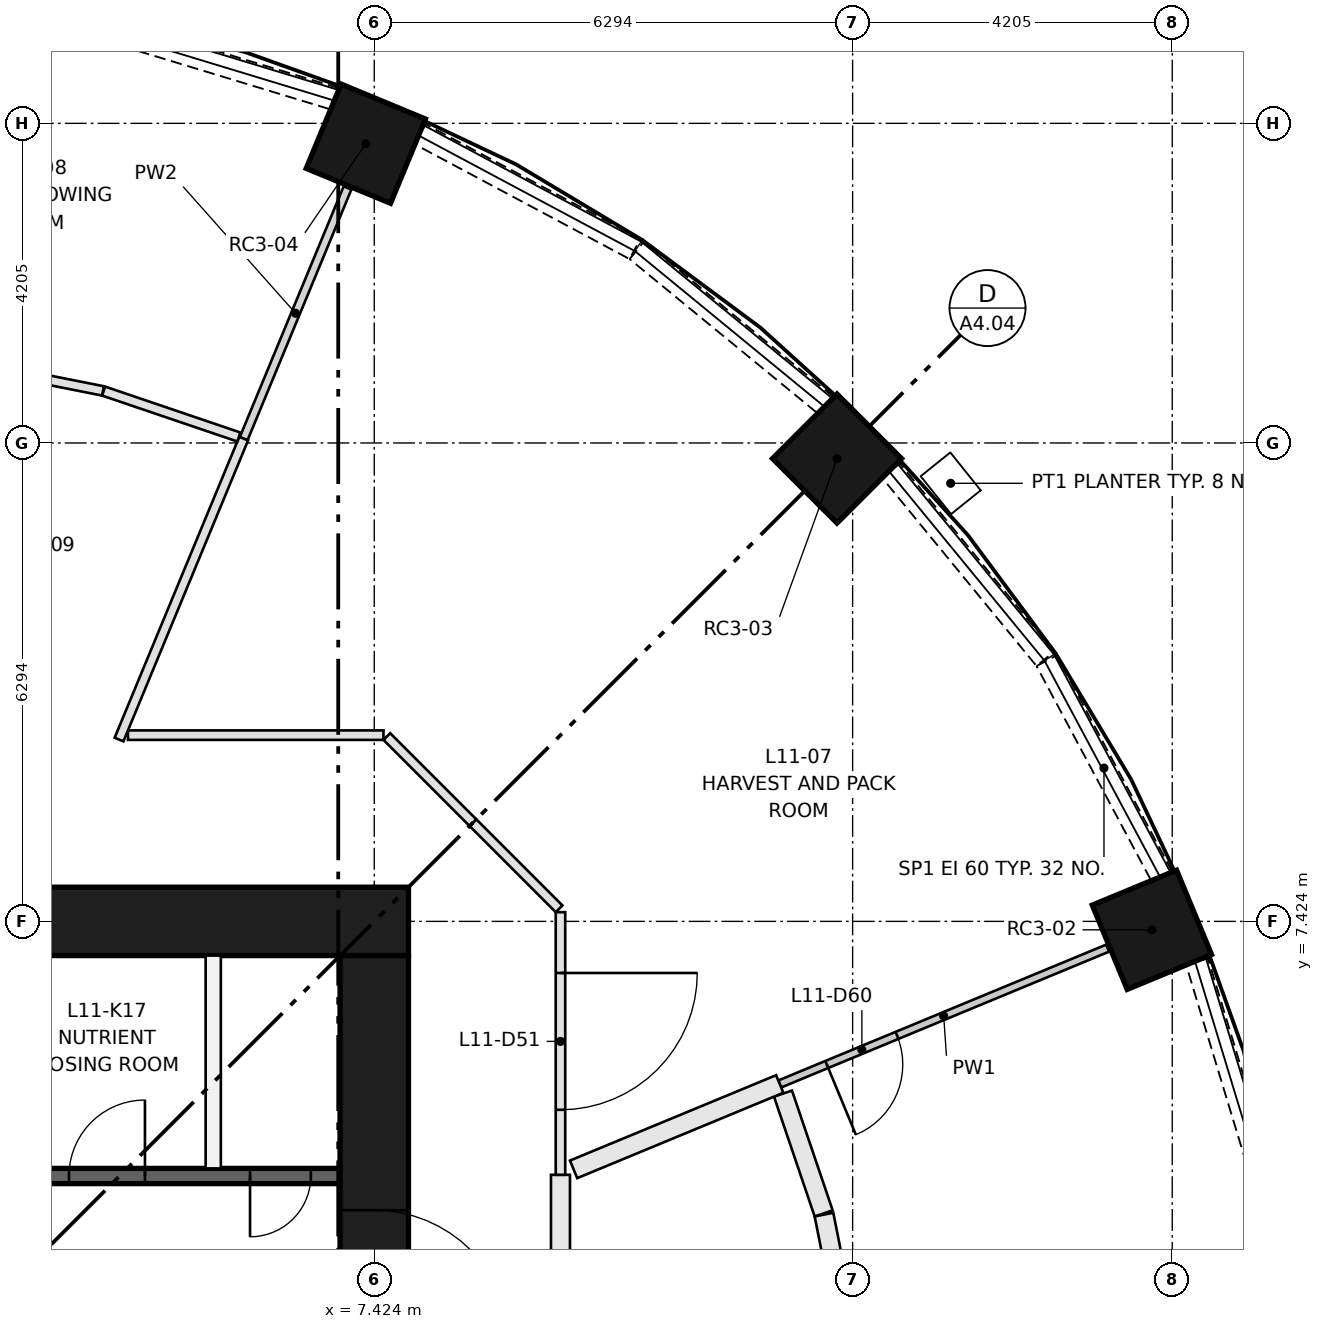
"""IFC4 building model, lengths in metres.
Left out: names, types, materials, properties, quantities, classifications, styles, units other than length and angle.
Written with IfcOpenShell. Run it as: python <this file> out.ifc"""

import sys

from ifc_helpers import new_model, si_unit, direction, frame, frame_2d, origin, origin_2d, place, context, subcontext, project, spatial, rectangle, extrude, element, fill, save


model = new_model("IFC4")
c1 = context("Model", 3, precision=1e-05, world=origin(), true_north=direction((0.0, 1.0)))
c2 = subcontext(c1, "Body", "Model", "MODEL_VIEW")
j1 = project(units=[si_unit("LENGTHUNIT", "METRE"), si_unit("PLANEANGLEUNIT", "RADIAN")], contexts=[c1])
p1 = place(None, origin())
s1 = spatial("IfcSite", under=j1, at=p1, CompositionType="ELEMENT")
p2 = place(p1, origin())
s2 = spatial("IfcBuilding", under=s1, at=p2, CompositionType="ELEMENT")
p3 = place(p2, frame((0.0, 0.0, 44.45)))
s3 = spatial("IfcBuildingStorey", under=s2, at=p3, CompositionType="ELEMENT", Elevation=44.45)
for number, where, z_axis, x_axis in (
    (1, (17.655, 7.313, 0.0), (0.0, 0.0, 1.0), (0.924, 0.383, 0.0)),
    (2, (13.513, 13.513, 0.0), (0.0, 0.0, 1.0), (0.707, 0.707, 0.0)),
    (3, (7.313, 17.655, 0.0), (0.0, 0.0, 1.0), (0.383, 0.924, 0.0)),
):
    element("IfcColumn", number, at=place(p3, frame(where, z_axis=z_axis, x_axis=x_axis)), inside=s3, PredefinedType="COLUMN", context=c2, shape_type="SweptSolid", body=[
        extrude(rectangle(XDim=1.2, YDim=1.2, at=origin_2d()), origin(), (0.0, 0.0, 1.0), 3.65),
    ])
p4 = place(p3, frame((-7.874, 7.424, 0.0), z_axis=(0.0, 0.0, 1.0), x_axis=(1.0, 0.0, 0.0)))
e4 = element("IfcWall", 4, at=p4, inside=s3, PredefinedType="SHEAR", context=c2, shape_type="SweptSolid", body=[
    extrude(rectangle(XDim=15.748, YDim=0.9, at=frame_2d((7.874, 0.0))), origin(), (0.0, 0.0, 1.0), 3.65),
])
p5 = place(p3, frame((7.424, -6.974, 0.0), z_axis=(0.0, 0.0, 1.0), x_axis=(0.0, 1.0, 0.0)))
e5 = element("IfcWall", 5, at=p5, inside=s3, PredefinedType="SHEAR", context=c2, shape_type="SweptSolid", body=[
    extrude(rectangle(XDim=13.948, YDim=0.9, at=frame_2d((6.974, 0.0))), origin(), (0.0, 0.0, 1.0), 3.65),
])
p6 = place(p5, frame((6.474, 0.0, 0.0)))
e6 = element("IfcOpeningElement", 6, at=p6, cuts=e5, PredefinedType="OPENING", context=c2, shape_type="SweptSolid", body=[
    extrude(rectangle(XDim=1.0, YDim=2.1, at=frame_2d((0.5, 1.05))), frame((0.0, 0.46, 0.0), z_axis=(0.0, -1.0, 0.0), x_axis=(1.0, 0.0, 0.0)), (0.0, 0.0, 1.0), 0.92),
])
p7 = place(p5, frame((3.35, 0.0, 0.0)))
e7 = element("IfcOpeningElement", 7, at=p7, cuts=e5, PredefinedType="OPENING", context=c2, shape_type="SweptSolid", body=[
    extrude(rectangle(XDim=1.8, YDim=2.1, at=frame_2d((0.9, 1.05))), frame((0.0, 0.46, 0.0), z_axis=(0.0, -1.0, 0.0), x_axis=(1.0, 0.0, 0.0)), (0.0, 0.0, 1.0), 0.92),
])
p8 = place(p5, frame((8.799, 0.0, 0.0)))
e8 = element("IfcOpeningElement", 8, at=p8, cuts=e5, PredefinedType="OPENING", context=c2, shape_type="SweptSolid", body=[
    extrude(rectangle(XDim=1.8, YDim=2.1, at=frame_2d((0.9, 1.05))), frame((0.0, 0.46, 0.0), z_axis=(0.0, -1.0, 0.0), x_axis=(1.0, 0.0, 0.0)), (0.0, 0.0, 1.0), 0.92),
])
p9 = place(p3, frame((0.0, 4.074, 0.0), z_axis=(0.0, 0.0, 1.0), x_axis=(1.0, 0.0, 0.0)))
e9 = element("IfcWall", 9, at=p9, inside=s3, PredefinedType="SHEAR", context=c2, shape_type="SweptSolid", body=[
    extrude(rectangle(XDim=6.974, YDim=0.2, at=frame_2d((3.487, 0.0))), origin(), (0.0, 0.0, 1.0), 3.3),
])
p10 = place(p9, frame((0.754, 0.0, 0.0)))
e10 = element("IfcOpeningElement", 10, at=p10, cuts=e9, PredefinedType="OPENING", context=c2, shape_type="SweptSolid", body=[
    extrude(rectangle(XDim=1.0, YDim=2.1, at=frame_2d((0.5, 1.05))), frame((0.0, 0.11, 0.0), z_axis=(0.0, -1.0, 0.0), x_axis=(1.0, 0.0, 0.0)), (0.0, 0.0, 1.0), 0.22),
])
p11 = place(p9, frame((3.407, 0.0, 0.0)))
e11 = element("IfcOpeningElement", 11, at=p11, cuts=e9, PredefinedType="OPENING", context=c2, shape_type="SweptSolid", body=[
    extrude(rectangle(XDim=1.0, YDim=2.1, at=frame_2d((0.5, 1.05))), frame((0.0, 0.11, 0.0), z_axis=(0.0, -1.0, 0.0), x_axis=(1.0, 0.0, 0.0)), (0.0, 0.0, 1.0), 0.22),
])
p12 = place(p9, frame((5.79, 0.0, 0.0)))
e12 = element("IfcOpeningElement", 12, at=p12, cuts=e9, PredefinedType="OPENING", context=c2, shape_type="SweptSolid", body=[
    extrude(rectangle(XDim=0.8, YDim=2.1, at=frame_2d((0.4, 1.05))), frame((0.0, 0.11, 0.0), z_axis=(0.0, -1.0, 0.0), x_axis=(1.0, 0.0, 0.0)), (0.0, 0.0, 1.0), 0.22),
])
p13 = place(p3, frame((5.305, 4.174, 0.0), z_axis=(0.0, 0.0, 1.0), x_axis=(0.0, 1.0, 0.0)))
e13 = element("IfcWall", 13, at=p13, inside=s3, PredefinedType="PARTITIONING", context=c2, shape_type="SweptSolid", body=[
    extrude(rectangle(XDim=2.8, YDim=0.2, at=frame_2d((1.4, 0.0))), origin(), (0.0, 0.0, 1.0), 3.3),
])
p14 = place(p3, frame((19.18, 3.83, 0.0), z_axis=(0.0, 0.0, 1.0), x_axis=(-0.290472877795, 0.956883225512, 0.0)))
e14 = element("IfcWall", 14, at=p14, inside=s3, PredefinedType="SOLIDWALL", context=c2, shape_type="SweptSolid", body=[
    extrude(rectangle(XDim=3.202, YDim=0.3, at=frame_2d((1.601, 0.0))), origin(), (0.0, 0.0, 1.0), 0.9),
])
p15 = place(p3, frame((17.78, 8.028, 0.0), z_axis=(0.0, 0.0, 1.0), x_axis=(-0.471284265614, 0.881981372243, 0.0)))
e15 = element("IfcWall", 15, at=p15, inside=s3, PredefinedType="SOLIDWALL", context=c2, shape_type="SweptSolid", body=[
    extrude(rectangle(XDim=3.204, YDim=0.3, at=frame_2d((1.602, 0.0))), origin(), (0.0, 0.0, 1.0), 0.9),
])
for number, where, z_axis, x_axis in (
    (16, (16.253, 10.879, 0.0), (0.0, 0.0, 1.0), (-0.634, 0.773, 0.0)),
    (17, (13.354, 14.222, 0.0), (0.0, 0.0, 1.0), (-0.773, 0.634, 0.0)),
):
    element("IfcWall", number, at=place(p3, frame(where, z_axis=z_axis, x_axis=x_axis)), inside=s3, PredefinedType="SOLIDWALL", context=c2, shape_type="SweptSolid", body=[
        extrude(rectangle(XDim=3.202, YDim=0.3, at=frame_2d((1.601, 0.0))), origin(), (0.0, 0.0, 1.0), 0.9),
    ])
p16 = place(p3, frame((10.854, 16.27, 0.0), z_axis=(0.0, 0.0, 1.0), x_axis=(-0.881981372243, 0.471284265614, 0.0)))
e18 = element("IfcWall", 18, at=p16, inside=s3, PredefinedType="SOLIDWALL", context=c2, shape_type="SweptSolid", body=[
    extrude(rectangle(XDim=3.204, YDim=0.3, at=frame_2d((1.602, 0.0))), origin(), (0.0, 0.0, 1.0), 0.9),
])
p17 = place(p3, frame((6.895, 18.25, 0.0), z_axis=(0.0, 0.0, 1.0), x_axis=(-0.956883225512, 0.290472877795, 0.0)))
e19 = element("IfcWall", 19, at=p17, inside=s3, PredefinedType="SOLIDWALL", context=c2, shape_type="SweptSolid", body=[
    extrude(rectangle(XDim=3.202, YDim=0.3, at=frame_2d((1.601, 0.0))), origin(), (0.0, 0.0, 1.0), 0.9),
])
p18 = place(p3, frame((9.874, 4.09, 0.0), z_axis=(0.0, 0.0, 1.0), x_axis=(0.0, -1.0, 0.0)))
e20 = element("IfcWall", 20, at=p18, inside=s3, PredefinedType="PARTITIONING", context=c2, shape_type="SweptSolid", body=[
    extrude(rectangle(XDim=4.09, YDim=0.25, at=frame_2d((2.045, 0.0))), origin(), (0.0, 0.0, 1.0), 3.3),
])
p19 = place(p18, frame((1.5, 0.0, 0.0)))
e21 = element("IfcOpeningElement", 21, at=p19, cuts=e20, PredefinedType="OPENING", context=c2, shape_type="SweptSolid", body=[
    extrude(rectangle(XDim=1.0, YDim=2.1, at=frame_2d((0.5, 1.05))), frame((0.0, 0.135, 0.0), z_axis=(0.0, -1.0, 0.0), x_axis=(1.0, 0.0, 0.0)), (0.0, 0.0, 1.0), 0.27),
])
p20 = place(p3, frame((8.722, 8.722, 0.0), z_axis=(0.0, 0.0, 1.0), x_axis=(0.70718294931, -0.707030604857, 0.0)))
e22 = element("IfcWall", 22, at=p20, inside=s3, PredefinedType="PARTITIONING", context=c2, shape_type="SweptSolid", body=[
    extrude(rectangle(XDim=1.603, YDim=0.125, at=frame_2d((0.801, 0.0))), origin(), (0.0, 0.0, 1.0), 3.3),
])
p21 = place(p3, frame((9.874, 7.545, 0.0), z_axis=(0.0, 0.0, 1.0), x_axis=(0.0, -1.0, 0.0)))
e23 = element("IfcWall", 23, at=p21, inside=s3, PredefinedType="PARTITIONING", context=c2, shape_type="SweptSolid", body=[
    extrude(rectangle(XDim=3.455, YDim=0.125, at=frame_2d((1.728, 0.0))), origin(), (0.0, 0.0, 1.0), 3.3),
])
p22 = place(p21, frame((0.8, 0.0, 0.0)))
e24 = element("IfcOpeningElement", 24, at=p22, cuts=e23, PredefinedType="OPENING", context=c2, shape_type="SweptSolid", body=[
    extrude(rectangle(XDim=1.8, YDim=2.1, at=frame_2d((0.9, 1.05))), frame((0.0, 0.073, 0.0), z_axis=(0.0, -1.0, 0.0), x_axis=(1.0, 0.0, 0.0)), (0.0, 0.0, 1.0), 0.145),
])
p23 = place(p3, frame((4.183, 9.874, 0.0), z_axis=(0.0, 0.0, 1.0), x_axis=(1.0, 0.0, 0.0)))
e25 = element("IfcWall", 25, at=p23, inside=s3, PredefinedType="PARTITIONING", context=c2, shape_type="SweptSolid", body=[
    extrude(rectangle(XDim=3.362, YDim=0.125, at=frame_2d((1.681, 0.0))), origin(), (0.0, 0.0, 1.0), 3.3),
])
p24 = place(p3, frame((7.589, 9.856, 0.0), z_axis=(0.0, 0.0, 1.0), x_axis=(0.707030604857, -0.70718294931, 0.0)))
e26 = element("IfcWall", 26, at=p24, inside=s3, PredefinedType="PARTITIONING", context=c2, shape_type="SweptSolid", body=[
    extrude(rectangle(XDim=1.603, YDim=0.125, at=frame_2d((0.801, 0.0))), origin(), (0.0, 0.0, 1.0), 3.3),
])
p25 = place(p3, frame((13.337, 3.582, 0.0), z_axis=(0.0, 0.0, 1.0), x_axis=(-0.321458381335, 0.946923708157, 0.0)))
e27 = element("IfcWall", 27, at=p25, inside=s3, PredefinedType="PARTITIONING", context=c2, shape_type="SweptSolid", body=[
    extrude(rectangle(XDim=1.665, YDim=0.25, at=frame_2d((0.833, 0.0))), origin(), (0.0, 0.0, 1.0), 3.3),
])
p26 = place(p3, frame((13.69, 1.811, 0.0), z_axis=(0.0, 0.0, 1.0), x_axis=(-0.195014530736, 0.980800353182, 0.0)))
e28 = element("IfcWall", 28, at=p26, inside=s3, PredefinedType="PARTITIONING", context=c2, shape_type="SweptSolid", body=[
    extrude(rectangle(XDim=1.79, YDim=0.25, at=frame_2d((0.895, 0.0))), origin(), (0.0, 0.0, 1.0), 3.3),
])
p27 = place(p3, frame((17.073, 7.072, 0.0), z_axis=(0.0, 0.0, 1.0), x_axis=(-0.92387920118, -0.382684232268, 0.0)))
e29 = element("IfcWall", 29, at=p27, inside=s3, PredefinedType="PARTITIONING", context=c2, shape_type="SweptSolid", body=[
    extrude(rectangle(XDim=4.67, YDim=0.1, at=frame_2d((2.335, 0.0))), origin(), (0.0, 0.0, 1.0), 3.3),
])
p28 = place(p27, frame((3.0, 0.0, 0.0)))
e30 = element("IfcOpeningElement", 30, at=p28, cuts=e29, PredefinedType="OPENING", context=c2, shape_type="SweptSolid", body=[
    extrude(rectangle(XDim=1.0, YDim=2.1, at=frame_2d((0.5, 1.05))), frame((0.0, 0.06, 0.0), z_axis=(0.0, -1.0, 0.0), x_axis=(1.0, 0.0, 0.0)), (0.0, 0.0, 1.0), 0.12),
])
p29 = place(p3, frame((10.047, 4.162, 0.0), z_axis=(0.0, 0.0, 1.0), x_axis=(0.92388200997, 0.382677451195, 0.0)))
e31 = element("IfcWall", 31, at=p29, inside=s3, PredefinedType="PARTITIONING", context=c2, shape_type="SweptSolid", body=[
    extrude(rectangle(XDim=2.935, YDim=0.25, at=frame_2d((1.468, 0.0))), origin(), (0.0, 0.0, 1.0), 3.3),
])
p30 = place(p3, frame((5.706, 13.775, 0.0), z_axis=(0.0, 0.0, 1.0), x_axis=(0.382706138858, 0.923870126847, 0.0)))
e32 = element("IfcWall", 32, at=p30, inside=s3, PredefinedType="PARTITIONING", context=c2, shape_type="SweptSolid", body=[
    extrude(rectangle(XDim=3.57, YDim=0.11, at=frame_2d((1.785, 0.0))), origin(), (0.0, 0.0, 1.0), 3.3),
])
p31 = place(p3, frame((4.066, 9.816, 0.0), z_axis=(0.0, 0.0, 1.0), x_axis=(0.382709065586, 0.923868914467, 0.0)))
e33 = element("IfcWall", 33, at=p31, inside=s3, PredefinedType="PARTITIONING", context=c2, shape_type="SweptSolid", body=[
    extrude(rectangle(XDim=4.285, YDim=0.125, at=frame_2d((2.143, 0.0))), origin(), (0.0, 0.0, 1.0), 3.3),
])
p32 = place(p3, frame((3.855, 14.403, 0.0), z_axis=(0.0, 0.0, 1.0), x_axis=(-0.980807266515, 0.194979757801, 0.0)))
e34 = element("IfcWall", 34, at=p32, inside=s3, PredefinedType="PARTITIONING", context=c2, shape_type="SweptSolid", body=[
    extrude(rectangle(XDim=1.942, YDim=0.125, at=frame_2d((0.971, 0.0))), origin(), (0.0, 0.0, 1.0), 3.3),
])
p33 = place(p3, frame((5.643, 13.796, 0.0), z_axis=(0.0, 0.0, 1.0), x_axis=(-0.946915165682, 0.321483543904, 0.0)))
e35 = element("IfcWall", 35, at=p33, inside=s3, PredefinedType="PARTITIONING", context=c2, shape_type="SweptSolid", body=[
    extrude(rectangle(XDim=1.88, YDim=0.125, at=frame_2d((0.94, 0.0))), origin(), (0.0, 0.0, 1.0), 3.3),
])
p34 = place(p11, origin())
e36 = element("IfcDoor", 36, at=p34, inside=s3, OperationType="SINGLE_SWING_RIGHT", PredefinedType="DOOR", context=c2, shape_type="SweptSolid", body=[
    extrude(rectangle(XDim=1.0, YDim=2.1, at=frame_2d((0.5, 1.05))), frame((0.0, 0.025, 0.0), z_axis=(0.0, -1.0, 0.0), x_axis=(1.0, 0.0, 0.0)), (0.0, 0.0, 1.0), 0.05),
])
fill(e11, e36)
p35 = place(p12, frame((0.8, 0.0, 0.0), z_axis=(0.0, 0.0, 1.0), x_axis=(-1.0, 0.0, 0.0)))
e37 = element("IfcDoor", 37, at=p35, inside=s3, OperationType="SINGLE_SWING_LEFT", PredefinedType="DOOR", context=c2, shape_type="SweptSolid", body=[
    extrude(rectangle(XDim=0.8, YDim=2.1, at=frame_2d((0.4, 1.05))), frame((0.0, 0.025, 0.0), z_axis=(0.0, -1.0, 0.0), x_axis=(1.0, 0.0, 0.0)), (0.0, 0.0, 1.0), 0.05),
])
fill(e12, e37)
p36 = place(p8, frame((1.8, 0.0, 0.0), z_axis=(0.0, 0.0, 1.0), x_axis=(-1.0, 0.0, 0.0)))
e38 = element("IfcDoor", 38, at=p36, inside=s3, OperationType="DOUBLE_DOOR_SINGLE_SWING", PredefinedType="DOOR", context=c2, shape_type="SweptSolid", body=[
    extrude(rectangle(XDim=1.8, YDim=2.1, at=frame_2d((0.9, 1.05))), frame((0.0, 0.025, 0.0), z_axis=(0.0, -1.0, 0.0), x_axis=(1.0, 0.0, 0.0)), (0.0, 0.0, 1.0), 0.05),
])
fill(e8, e38)
p37 = place(p22, origin())
e39 = element("IfcDoor", 39, at=p37, inside=s3, OperationType="DOUBLE_DOOR_SINGLE_SWING", PredefinedType="DOOR", context=c2, shape_type="SweptSolid", body=[
    extrude(rectangle(XDim=1.8, YDim=2.1, at=frame_2d((0.9, 1.05))), frame((0.0, 0.025, 0.0), z_axis=(0.0, -1.0, 0.0), x_axis=(1.0, 0.0, 0.0)), (0.0, 0.0, 1.0), 0.05),
])
fill(e24, e39)
p38 = place(p28, origin())
e40 = element("IfcDoor", 40, at=p38, inside=s3, OperationType="SINGLE_SWING_RIGHT", PredefinedType="DOOR", context=c2, shape_type="SweptSolid", body=[
    extrude(rectangle(XDim=1.0, YDim=2.1, at=frame_2d((0.5, 1.05))), frame((0.0, 0.025, 0.0), z_axis=(0.0, -1.0, 0.0), x_axis=(1.0, 0.0, 0.0)), (0.0, 0.0, 1.0), 0.05),
])
fill(e30, e40)
save(model, sys.argv[1])
